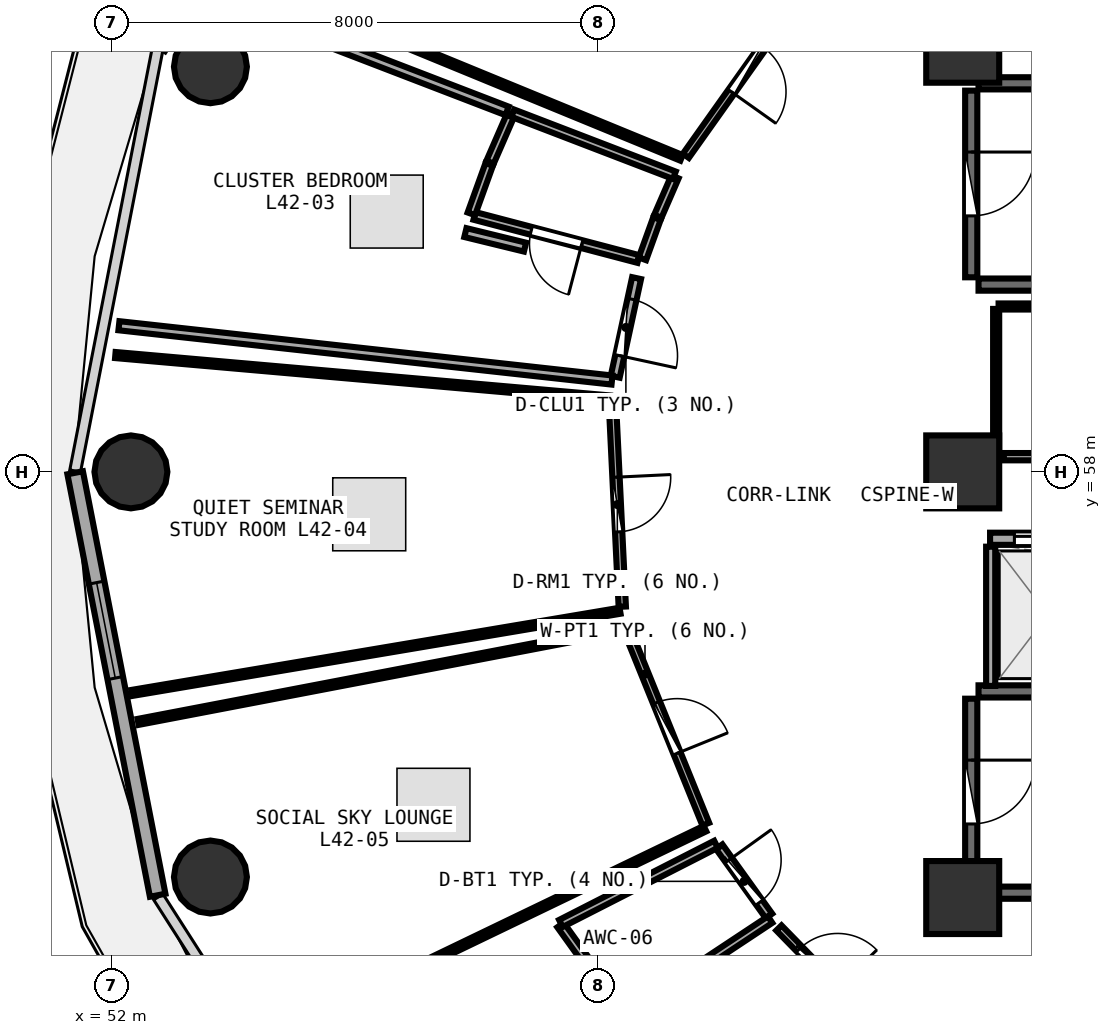
"""IFC4 building model, lengths in metres.
Left out: names, types, materials, properties, quantities, classifications, styles, units other than length and angle.
Written with IfcOpenShell. Run it as: python <this file> out.ifc"""

import sys

from ifc_helpers import new_model, si_unit, direction, frame, frame_2d, origin, origin_2d, place, context, subcontext, project, spatial, rectangle, circle, extrude, element, fill, save


model = new_model("IFC4")
c1 = context("Model", 3, precision=1e-05, world=origin(), true_north=direction((0.0, 1.0)))
c2 = subcontext(c1, "Body", "Model", "MODEL_VIEW")
j1 = project(units=[si_unit("LENGTHUNIT", "METRE"), si_unit("PLANEANGLEUNIT", "RADIAN")], contexts=[c1])
p1 = place(None, origin())
s1 = spatial("IfcSite", under=j1, at=p1, CompositionType="ELEMENT")
p2 = place(p1, origin())
s2 = spatial("IfcBuilding", under=s1, at=p2, CompositionType="ELEMENT")
p3 = place(p2, frame((0.0, 0.0, 165.6)))
s3 = spatial("IfcBuildingStorey", under=s2, at=p3, CompositionType="ELEMENT", Elevation=165.6)
for number, where, z_axis, x_axis in (
    (1, (66.0, 51.0, 0.0), (0.0, 0.0, 1.0), (1.0, 0.0, 0.0)),
    (2, (66.0, 65.0, 0.0), (0.0, 0.0, 1.0), (1.0, 0.0, 0.0)),
    (3, (66.0, 58.0, 0.0), (0.0, 0.0, 1.0), (1.0, 0.0, 0.0)),
):
    element("IfcColumn", number, at=place(p3, frame(where, z_axis=z_axis, x_axis=x_axis)), inside=s3, PredefinedType="PILASTER", context=c2, shape_type="SweptSolid", body=[
        extrude(rectangle(XDim=1.2, YDim=1.2, at=origin_2d()), origin(), (0.0, 0.0, 1.0), 3.75),
    ])
for number, where, z_axis, x_axis in (
    (4, (53.627, 64.663, 0.0), (0.0, 0.0, 1.0), (1.0, 0.0, 0.0)),
    (5, (52.32, 58.0, 0.0), (0.0, 0.0, 1.0), (1.0, 0.0, 0.0)),
    (6, (53.627, 51.337, 0.0), (0.0, 0.0, 1.0), (1.0, 0.0, 0.0)),
):
    element("IfcColumn", number, at=place(p3, frame(where, z_axis=z_axis, x_axis=x_axis)), inside=s3, PredefinedType="COLUMN", context=c2, shape_type="SweptSolid", body=[
        extrude(circle(Radius=0.6, at=origin_2d()), origin(), (0.0, 0.0, 1.0), 3.75),
    ])
p4 = place(p3, frame((51.403, 57.985, 0.0), z_axis=(0.0, 0.0, 1.0), x_axis=(0.191716984769, -0.981450252306, 0.0)))
e7 = element("IfcWall", 7, at=p4, inside=s3, PredefinedType="SOLIDWALL", context=c2, shape_type="SweptSolid", body=[
    extrude(rectangle(XDim=7.079, YDim=0.26, at=frame_2d((3.54, 0.0))), origin(), (0.0, 0.0, 1.0), 3.475),
])
p5 = place(p4, frame((1.84, 0.0, 0.85)))
e8 = element("IfcOpeningElement", 8, at=p5, cuts=e7, PredefinedType="OPENING", context=c2, shape_type="SweptSolid", body=[
    extrude(rectangle(XDim=1.6, YDim=1.45, at=frame_2d((0.8, 0.725))), frame((0.0, 0.14, 0.0), z_axis=(0.0, -1.0, 0.0), x_axis=(1.0, 0.0, 0.0)), (0.0, 0.0, 1.0), 0.28),
])
for number, where, z_axis, x_axis in (
    (9, (66.26, 61.08, 0.0), (0.0, 0.0, 1.0), (1.0, 0.0, 0.0)),
    (10, (73.42, 64.39, 0.0), (0.0, 0.0, 1.0), (-1.0, 0.0, 0.0)),
):
    element("IfcWall", number, at=place(p3, frame(where, z_axis=z_axis, x_axis=x_axis)), inside=s3, PredefinedType="SHEAR", context=c2, shape_type="SweptSolid", body=[
        extrude(rectangle(XDim=7.16, YDim=0.2, at=frame_2d((3.58, 0.0))), origin(), (0.0, 0.0, 1.0), 3.49),
    ])
p6 = place(p3, frame((66.14, 64.27, 0.0), z_axis=(0.0, 0.0, 1.0), x_axis=(0.0, -1.0, 0.0)))
e11 = element("IfcWall", 11, at=p6, inside=s3, PredefinedType="SHEAR", context=c2, shape_type="SweptSolid", body=[
    extrude(rectangle(XDim=3.07, YDim=0.2, at=frame_2d((1.535, 0.0))), origin(), (0.0, 0.0, 1.0), 3.49),
])
p7 = place(p6, frame((1.01, 0.0, 0.0)))
e12 = element("IfcOpeningElement", 12, at=p7, cuts=e11, PredefinedType="OPENING", context=c2, shape_type="SweptSolid", body=[
    extrude(rectangle(XDim=1.05, YDim=2.1, at=frame_2d((0.525, 1.05))), frame((0.0, 0.11, 0.0), z_axis=(0.0, -1.0, 0.0), x_axis=(1.0, 0.0, 0.0)), (0.0, 0.0, 1.0), 0.22),
])
for number, where, z_axis, x_axis in (
    (13, (66.26, 51.08, 0.0), (0.0, 0.0, 1.0), (1.0, 0.0, 0.0)),
    (14, (73.42, 54.39, 0.0), (0.0, 0.0, 1.0), (-1.0, 0.0, 0.0)),
):
    element("IfcWall", number, at=place(p3, frame(where, z_axis=z_axis, x_axis=x_axis)), inside=s3, PredefinedType="SHEAR", context=c2, shape_type="SweptSolid", body=[
        extrude(rectangle(XDim=7.16, YDim=0.2, at=frame_2d((3.58, 0.0))), origin(), (0.0, 0.0, 1.0), 3.49),
    ])
p8 = place(p3, frame((66.14, 54.27, 0.0), z_axis=(0.0, 0.0, 1.0), x_axis=(0.0, -1.0, 0.0)))
e15 = element("IfcWall", 15, at=p8, inside=s3, PredefinedType="SHEAR", context=c2, shape_type="SweptSolid", body=[
    extrude(rectangle(XDim=3.07, YDim=0.2, at=frame_2d((1.535, 0.0))), origin(), (0.0, 0.0, 1.0), 3.49),
])
p9 = place(p8, frame((1.01, 0.0, 0.0)))
e16 = element("IfcOpeningElement", 16, at=p9, cuts=e15, PredefinedType="OPENING", context=c2, shape_type="SweptSolid", body=[
    extrude(rectangle(XDim=1.05, YDim=2.1, at=frame_2d((0.525, 1.05))), frame((0.0, 0.11, 0.0), z_axis=(0.0, -1.0, 0.0), x_axis=(1.0, 0.0, 0.0)), (0.0, 0.0, 1.0), 0.22),
])
p10 = place(p3, frame((66.45, 56.9, 0.0), z_axis=(0.0, 0.0, 1.0), x_axis=(1.0, 0.0, 0.0)))
e17 = element("IfcWall", 17, at=p10, inside=s3, PredefinedType="SOLIDWALL", context=c2, shape_type="SweptSolid", body=[
    extrude(rectangle(XDim=14.4, YDim=0.2, at=frame_2d((7.2, 0.0))), origin(), (0.0, 0.0, 1.0), 3.48),
])
p11 = place(p10, frame((0.4, 0.0, 0.0)))
e18 = element("IfcOpeningElement", 18, at=p11, cuts=e17, PredefinedType="OPENING", context=c2, shape_type="SweptSolid", body=[
    extrude(rectangle(XDim=1.1, YDim=2.1, at=frame_2d((0.55, 1.05))), frame((0.0, 0.11, 0.0), z_axis=(0.0, -1.0, 0.0), x_axis=(1.0, 0.0, 0.0)), (0.0, 0.0, 1.0), 0.22),
])
p12 = place(p10, frame((2.4, 0.0, 0.0)))
e19 = element("IfcOpeningElement", 19, at=p12, cuts=e17, PredefinedType="OPENING", context=c2, shape_type="SweptSolid", body=[
    extrude(rectangle(XDim=1.1, YDim=2.1, at=frame_2d((0.55, 1.05))), frame((0.0, 0.11, 0.0), z_axis=(0.0, -1.0, 0.0), x_axis=(1.0, 0.0, 0.0)), (0.0, 0.0, 1.0), 0.22),
])
p13 = place(p10, frame((4.4, 0.0, 0.0)))
e20 = element("IfcOpeningElement", 20, at=p13, cuts=e17, PredefinedType="OPENING", context=c2, shape_type="SweptSolid", body=[
    extrude(rectangle(XDim=1.1, YDim=2.1, at=frame_2d((0.55, 1.05))), frame((0.0, 0.11, 0.0), z_axis=(0.0, -1.0, 0.0), x_axis=(1.0, 0.0, 0.0)), (0.0, 0.0, 1.0), 0.22),
])
p14 = place(p3, frame((66.46, 54.48, 0.0), z_axis=(0.0, 0.0, 1.0), x_axis=(0.0, 1.0, 0.0)))
e21 = element("IfcWall", 21, at=p14, inside=s3, PredefinedType="PARTITIONING", context=c2, shape_type="SweptSolid", body=[
    extrude(rectangle(XDim=2.29, YDim=0.15, at=frame_2d((1.145, 0.0))), origin(), (0.0, 0.0, 1.0), 3.48),
])
p15 = place(p3, frame((66.675, 58.25, 0.0), z_axis=(0.0, 0.0, 1.0), x_axis=(1.0, 0.0, 0.0)))
e22 = element("IfcWall", 22, at=p15, inside=s3, PredefinedType="PARTITIONING", context=c2, shape_type="SweptSolid", body=[
    extrude(rectangle(XDim=3.265, YDim=0.12, at=frame_2d((1.632, 0.0))), origin(), (0.0, 0.0, 1.0), 3.48),
])
p16 = place(p15, frame((1.182, 0.0, 0.0)))
e23 = element("IfcOpeningElement", 23, at=p16, cuts=e22, PredefinedType="OPENING", context=c2, shape_type="SweptSolid", body=[
    extrude(rectangle(XDim=0.9, YDim=2.08, at=frame_2d((0.45, 1.04))), frame((0.0, 0.07, 0.0), z_axis=(0.0, -1.0, 0.0), x_axis=(1.0, 0.0, 0.0)), (0.0, 0.0, 1.0), 0.14),
])
p17 = place(p3, frame((63.462, 66.038, 0.0), z_axis=(0.0, 0.0, 1.0), x_axis=(-0.578762045024, -0.815496471629, 0.0)))
e24 = element("IfcWall", 24, at=p17, inside=s3, PredefinedType="PARTITIONING", context=c2, shape_type="SweptSolid", body=[
    extrude(rectangle(XDim=3.483, YDim=0.12, at=frame_2d((1.741, 0.0))), origin(), (0.0, 0.0, 1.0), 2.975),
])
p18 = place(p17, frame((1.291, 0.0, 0.0)))
e25 = element("IfcOpeningElement", 25, at=p18, cuts=e24, PredefinedType="OPENING", context=c2, shape_type="SweptSolid", body=[
    extrude(rectangle(XDim=0.9, YDim=2.08, at=frame_2d((0.45, 1.04))), frame((0.0, 0.07, 0.0), z_axis=(0.0, -1.0, 0.0), x_axis=(1.0, 0.0, 0.0)), (0.0, 0.0, 1.0), 0.14),
])
p19 = place(p3, frame((60.667, 61.5, 0.0), z_axis=(0.0, 0.0, 1.0), x_axis=(-0.967098346806, 0.254402805813, 0.0)))
e26 = element("IfcWall", 26, at=p19, inside=s3, PredefinedType="PLUMBINGWALL", context=c2, shape_type="SweptSolid", body=[
    extrude(rectangle(XDim=2.789, YDim=0.13, at=frame_2d((1.395, 0.0))), origin(), (0.0, 0.0, 1.0), 3.175),
])
p20 = place(p19, frame((0.964, 0.0, 0.0)))
e27 = element("IfcOpeningElement", 27, at=p20, cuts=e26, PredefinedType="OPENING", context=c2, shape_type="SweptSolid", body=[
    extrude(rectangle(XDim=0.86, YDim=2.05, at=frame_2d((0.43, 1.025))), frame((0.0, 0.075, 0.0), z_axis=(0.0, -1.0, 0.0), x_axis=(1.0, 0.0, 0.0)), (0.0, 0.0, 1.0), 0.15),
])
p21 = place(p3, frame((60.636, 61.186, 0.0), z_axis=(0.0, 0.0, 1.0), x_axis=(-0.211879832264, -0.977295726318, 0.0)))
e28 = element("IfcWall", 28, at=p21, inside=s3, PredefinedType="PARTITIONING", context=c2, shape_type="SweptSolid", body=[
    extrude(rectangle(XDim=1.659, YDim=0.15, at=frame_2d((0.83, 0.0))), origin(), (0.0, 0.0, 1.0), 3.48),
])
p22 = place(p21, frame((0.355, 0.0, 0.0)))
e29 = element("IfcOpeningElement", 29, at=p22, cuts=e28, PredefinedType="OPENING", context=c2, shape_type="SweptSolid", body=[
    extrude(rectangle(XDim=0.95, YDim=2.08, at=frame_2d((0.475, 1.04))), frame((0.0, 0.085, 0.0), z_axis=(0.0, -1.0, 0.0), x_axis=(1.0, 0.0, 0.0)), (0.0, 0.0, 1.0), 0.17),
])
p23 = place(p3, frame((60.238, 59.144, 0.0), z_axis=(0.0, 0.0, 1.0), x_axis=(0.048537190422, -0.998821375996, 0.0)))
e30 = element("IfcWall", 30, at=p23, inside=s3, PredefinedType="PARTITIONING", context=c2, shape_type="SweptSolid", body=[
    extrude(rectangle(XDim=3.365, YDim=0.12, at=frame_2d((1.683, 0.0))), origin(), (0.0, 0.0, 1.0), 2.975),
])
p24 = place(p23, frame((1.233, 0.0, 0.0)))
e31 = element("IfcOpeningElement", 31, at=p24, cuts=e30, PredefinedType="OPENING", context=c2, shape_type="SweptSolid", body=[
    extrude(rectangle(XDim=0.9, YDim=2.08, at=frame_2d((0.45, 1.04))), frame((0.0, 0.07, 0.0), z_axis=(0.0, -1.0, 0.0), x_axis=(1.0, 0.0, 0.0)), (0.0, 0.0, 1.0), 0.14),
])
p25 = place(p3, frame((60.492, 55.369, 0.0), z_axis=(0.0, 0.0, 1.0), x_axis=(0.3756420079, -0.926764847143, 0.0)))
e32 = element("IfcWall", 32, at=p25, inside=s3, PredefinedType="PARTITIONING", context=c2, shape_type="SweptSolid", body=[
    extrude(rectangle(XDim=3.413, YDim=0.12, at=frame_2d((1.707, 0.0))), origin(), (0.0, 0.0, 1.0), 3.235),
])
p26 = place(p25, frame((1.256, 0.0, 0.0)))
e33 = element("IfcOpeningElement", 33, at=p26, cuts=e32, PredefinedType="OPENING", context=c2, shape_type="SweptSolid", body=[
    extrude(rectangle(XDim=0.9, YDim=2.08, at=frame_2d((0.45, 1.04))), frame((0.0, 0.07, 0.0), z_axis=(0.0, -1.0, 0.0), x_axis=(1.0, 0.0, 0.0)), (0.0, 0.0, 1.0), 0.14),
])
p27 = place(p3, frame((61.995, 51.836, 0.0), z_axis=(0.0, 0.0, 1.0), x_axis=(0.583589438572, -0.81204886995, 0.0)))
e34 = element("IfcWall", 34, at=p27, inside=s3, PredefinedType="PLUMBINGWALL", context=c2, shape_type="SweptSolid", body=[
    extrude(rectangle(XDim=1.403, YDim=0.13, at=frame_2d((0.702, 0.0))), origin(), (0.0, 0.0, 1.0), 2.975),
])
p28 = place(p27, frame((0.272, 0.0, 0.0)))
e35 = element("IfcOpeningElement", 35, at=p28, cuts=e34, PredefinedType="OPENING", context=c2, shape_type="SweptSolid", body=[
    extrude(rectangle(XDim=0.86, YDim=2.05, at=frame_2d((0.43, 1.025))), frame((0.0, 0.075, 0.0), z_axis=(0.0, -1.0, 0.0), x_axis=(1.0, 0.0, 0.0)), (0.0, 0.0, 1.0), 0.15),
])
p29 = place(p3, frame((62.977, 50.5, 0.0), z_axis=(0.0, 0.0, 1.0), x_axis=(0.69801962686, -0.71607862733, 0.0)))
e36 = element("IfcWall", 36, at=p29, inside=s3, PredefinedType="PARTITIONING", context=c2, shape_type="SweptSolid", body=[
    extrude(rectangle(XDim=1.866, YDim=0.12, at=frame_2d((0.933, 0.0))), origin(), (0.0, 0.0, 1.0), 2.975),
])
p30 = place(p29, frame((0.483, 0.0, 0.0)))
e37 = element("IfcOpeningElement", 37, at=p30, cuts=e36, PredefinedType="OPENING", context=c2, shape_type="SweptSolid", body=[
    extrude(rectangle(XDim=0.9, YDim=2.08, at=frame_2d((0.45, 1.04))), frame((0.0, 0.07, 0.0), z_axis=(0.0, -1.0, 0.0), x_axis=(1.0, 0.0, 0.0)), (0.0, 0.0, 1.0), 0.14),
])
p31 = place(p3, frame((69.96, 60.72, 0.0), z_axis=(0.0, 0.0, 1.0), x_axis=(-1.0, 0.0, 0.0)))
e38 = element("IfcWall", 38, at=p31, inside=s3, PredefinedType="PARTITIONING", context=c2, shape_type="SweptSolid", body=[
    extrude(rectangle(XDim=3.37, YDim=0.1, at=frame_2d((1.685, 0.0))), origin(), (0.0, 0.0, 1.0), 3.48),
])
p32 = place(p3, frame((66.55, 60.68, 0.0), z_axis=(0.0, 0.0, 1.0), x_axis=(0.0, -1.0, 0.0)))
e39 = element("IfcWall", 39, at=p32, inside=s3, PredefinedType="PARTITIONING", context=c2, shape_type="SweptSolid", body=[
    extrude(rectangle(XDim=2.383, YDim=0.1, at=frame_2d((1.191, 0.0))), origin(), (0.0, 0.0, 1.0), 3.48),
])
p33 = place(p3, frame((61.375, 63.164, 0.0), z_axis=(0.0, 0.0, 1.0), x_axis=(-0.924943940784, 0.380103546953, 0.0)))
e40 = element("IfcWall", 40, at=p33, inside=s3, PredefinedType="PARTITIONING", context=c2, shape_type="SweptSolid", body=[
    extrude(rectangle(XDim=8.038, YDim=0.1, at=frame_2d((4.019, 0.0))), origin(), (0.0, 0.0, 1.0), 2.975),
])
p34 = place(p3, frame((61.268, 62.853, 0.0), z_axis=(0.0, 0.0, 1.0), x_axis=(-0.398284741881, -0.917261829787, 0.0)))
e41 = element("IfcWall", 41, at=p34, inside=s3, PredefinedType="PLUMBINGWALL", context=c2, shape_type="SweptSolid", body=[
    extrude(rectangle(XDim=0.708, YDim=0.13, at=frame_2d((0.354, 0.0))), origin(), (0.0, 0.0, 1.0), 3.235),
])
p35 = place(p3, frame((60.971, 62.166, 0.0), z_axis=(0.0, 0.0, 1.0), x_axis=(-0.340044773791, -0.940409246987, 0.0)))
e42 = element("IfcWall", 42, at=p35, inside=s3, PredefinedType="PLUMBINGWALL", context=c2, shape_type="SweptSolid", body=[
    extrude(rectangle(XDim=0.704, YDim=0.13, at=frame_2d((0.352, 0.0))), origin(), (0.0, 0.0, 1.0), 3.235),
])
p36 = place(p3, frame((57.919, 62.244, 0.0), z_axis=(0.0, 0.0, 1.0), x_axis=(0.339790338004, 0.9405012101, 0.0)))
e43 = element("IfcWall", 43, at=p36, inside=s3, PredefinedType="PLUMBINGWALL", context=c2, shape_type="SweptSolid", body=[
    extrude(rectangle(XDim=0.864, YDim=0.13, at=frame_2d((0.432, 0.0))), origin(), (0.0, 0.0, 1.0), 3.175),
])
p37 = place(p3, frame((58.227, 63.093, 0.0), z_axis=(0.0, 0.0, 1.0), x_axis=(0.39925148709, 0.916841453064, 0.0)))
e44 = element("IfcWall", 44, at=p37, inside=s3, PredefinedType="PLUMBINGWALL", context=c2, shape_type="SweptSolid", body=[
    extrude(rectangle(XDim=0.866, YDim=0.13, at=frame_2d((0.433, 0.0))), origin(), (0.0, 0.0, 1.0), 3.175),
])
p38 = place(p3, frame((58.6, 63.899, 0.0), z_axis=(0.0, 0.0, 1.0), x_axis=(0.933544382438, -0.358461833418, 0.0)))
e45 = element("IfcWall", 45, at=p38, inside=s3, PredefinedType="PLUMBINGWALL", context=c2, shape_type="SweptSolid", body=[
    extrude(rectangle(XDim=2.847, YDim=0.13, at=frame_2d((1.423, 0.0))), origin(), (0.0, 0.0, 1.0), 3.175),
])
p39 = place(p3, frame((60.232, 59.51, 0.0), z_axis=(0.0, 0.0, 1.0), x_axis=(-0.993990557846, 0.109465843587, 0.0)))
e46 = element("IfcWall", 46, at=p39, inside=s3, PredefinedType="PARTITIONING", context=c2, shape_type="SweptSolid", body=[
    extrude(rectangle(XDim=8.158, YDim=0.15, at=frame_2d((4.079, 0.0))), origin(), (0.0, 0.0, 1.0), 3.025),
])
p40 = place(p3, frame((53.723, 65.777, 0.0), z_axis=(0.0, 0.0, 1.0), x_axis=(0.933303856141, -0.359087610636, 0.0)))
e47 = element("IfcWall", 47, at=p40, inside=s3, PredefinedType="PARTITIONING", context=c2, shape_type="SweptSolid", body=[
    extrude(rectangle(XDim=5.125, YDim=0.15, at=frame_2d((2.562, 0.0))), origin(), (0.0, 0.0, 1.0), 2.975),
])
p41 = place(p3, frame((57.821, 61.936, 0.0), z_axis=(0.0, 0.0, 1.0), x_axis=(0.971451046406, -0.237240098712, 0.0)))
e48 = element("IfcWall", 48, at=p41, inside=s3, PredefinedType="PARTITIONING", context=c2, shape_type="SweptSolid", body=[
    extrude(rectangle(XDim=1.01, YDim=0.15, at=frame_2d((0.505, 0.0))), origin(), (0.0, 0.0, 1.0), 3.175),
])
p42 = place(p3, frame((60.365, 55.716, 0.0), z_axis=(0.0, 0.0, 1.0), x_axis=(-0.986127701838, -0.165988420279, 0.0)))
e49 = element("IfcWall", 49, at=p42, inside=s3, PredefinedType="PARTITIONING", context=c2, shape_type="SweptSolid", body=[
    extrude(rectangle(XDim=8.144, YDim=0.1, at=frame_2d((4.072, 0.0))), origin(), (0.0, 0.0, 1.0), 3.025),
])
p43 = place(p3, frame((52.064, 59.921, 0.0), z_axis=(0.0, 0.0, 1.0), x_axis=(0.996168646625, -0.087453001553, 0.0)))
e50 = element("IfcWall", 50, at=p43, inside=s3, PredefinedType="PARTITIONING", context=c2, shape_type="SweptSolid", body=[
    extrude(rectangle(XDim=8.163, YDim=0.1, at=frame_2d((4.082, 0.0))), origin(), (0.0, 0.0, 1.0), 3.025),
])
p44 = place(p3, frame((61.761, 52.134, 0.0), z_axis=(0.0, 0.0, 1.0), x_axis=(-0.900968975812, -0.433883515042, 0.0)))
e51 = element("IfcWall", 51, at=p44, inside=s3, PredefinedType="PARTITIONING", context=c2, shape_type="SweptSolid", body=[
    extrude(rectangle(XDim=8.0, YDim=0.1, at=frame_2d((4.0, 0.0))), origin(), (0.0, 0.0, 1.0), 2.975),
])
p45 = place(p3, frame((52.438, 53.888, 0.0), z_axis=(0.0, 0.0, 1.0), x_axis=(0.982187250003, 0.187904778897, 0.0)))
e52 = element("IfcWall", 52, at=p45, inside=s3, PredefinedType="PARTITIONING", context=c2, shape_type="SweptSolid", body=[
    extrude(rectangle(XDim=8.137, YDim=0.1, at=frame_2d((4.069, 0.0))), origin(), (0.0, 0.0, 1.0), 3.025),
])
p46 = place(p3, frame((62.832, 50.637, 0.0), z_axis=(0.0, 0.0, 1.0), x_axis=(-0.833743735775, -0.55215159427, 0.0)))
e53 = element("IfcWall", 53, at=p46, inside=s3, PredefinedType="PLUMBINGWALL", context=c2, shape_type="SweptSolid", body=[
    extrude(rectangle(XDim=2.833, YDim=0.13, at=frame_2d((1.416, 0.0))), origin(), (0.0, 0.0, 1.0), 3.235),
])
p47 = place(p3, frame((60.442, 49.078, 0.0), z_axis=(0.0, 0.0, 1.0), x_axis=(-0.583480474688, 0.812127167172, 0.0)))
e54 = element("IfcWall", 54, at=p47, inside=s3, PredefinedType="PLUMBINGWALL", context=c2, shape_type="SweptSolid", body=[
    extrude(rectangle(XDim=1.811, YDim=0.13, at=frame_2d((0.906, 0.0))), origin(), (0.0, 0.0, 1.0), 3.48),
])
p48 = place(p3, frame((59.392, 50.574, 0.0), z_axis=(0.0, 0.0, 1.0), x_axis=(0.890678731245, 0.45463325627, 0.0)))
e55 = element("IfcWall", 55, at=p48, inside=s3, PredefinedType="PLUMBINGWALL", context=c2, shape_type="SweptSolid", body=[
    extrude(rectangle(XDim=2.863, YDim=0.13, at=frame_2d((1.432, 0.0))), origin(), (0.0, 0.0, 1.0), 2.975),
])
p49 = place(p5, origin())
e56 = element("IfcWindow", 56, at=p49, inside=s3, PartitioningType="SINGLE_PANEL", PredefinedType="WINDOW", context=c2, shape_type="SweptSolid", body=[
    extrude(rectangle(XDim=1.6, YDim=1.45, at=frame_2d((0.8, 0.725))), frame((0.0, 0.03, 0.0), z_axis=(0.0, -1.0, 0.0), x_axis=(1.0, 0.0, 0.0)), (0.0, 0.0, 1.0), 0.06),
])
fill(e8, e56)
p50 = place(p7, origin())
e57 = element("IfcDoor", 57, at=p50, inside=s3, OperationType="SINGLE_SWING_LEFT", PredefinedType="DOOR", context=c2, shape_type="SweptSolid", body=[
    extrude(rectangle(XDim=1.05, YDim=2.1, at=frame_2d((0.525, 1.05))), frame((0.0, 0.025, 0.0), z_axis=(0.0, -1.0, 0.0), x_axis=(1.0, 0.0, 0.0)), (0.0, 0.0, 1.0), 0.05),
])
fill(e12, e57)
p51 = place(p9, origin())
e58 = element("IfcDoor", 58, at=p51, inside=s3, OperationType="SINGLE_SWING_LEFT", PredefinedType="DOOR", context=c2, shape_type="SweptSolid", body=[
    extrude(rectangle(XDim=1.05, YDim=2.1, at=frame_2d((0.525, 1.05))), frame((0.0, 0.025, 0.0), z_axis=(0.0, -1.0, 0.0), x_axis=(1.0, 0.0, 0.0)), (0.0, 0.0, 1.0), 0.05),
])
fill(e16, e58)
p52 = place(p11, origin())
e59 = element("IfcDoor", 59, at=p52, inside=s3, OperationType="DOUBLE_DOOR_SLIDING", PredefinedType="DOOR", context=c2, shape_type="SweptSolid", body=[
    extrude(rectangle(XDim=1.1, YDim=2.1, at=frame_2d((0.55, 1.05))), frame((0.0, 0.025, 0.0), z_axis=(0.0, -1.0, 0.0), x_axis=(1.0, 0.0, 0.0)), (0.0, 0.0, 1.0), 0.05),
])
fill(e18, e59)
p53 = place(p18, origin())
e60 = element("IfcDoor", 60, at=p53, inside=s3, OperationType="SINGLE_SWING_RIGHT", PredefinedType="DOOR", context=c2, shape_type="SweptSolid", body=[
    extrude(rectangle(XDim=0.9, YDim=2.08, at=frame_2d((0.45, 1.04))), frame((0.0, 0.025, 0.0), z_axis=(0.0, -1.0, 0.0), x_axis=(1.0, 0.0, 0.0)), (0.0, 0.0, 1.0), 0.05),
])
fill(e25, e60)
p54 = place(p20, origin())
e61 = element("IfcDoor", 61, at=p54, inside=s3, OperationType="SINGLE_SWING_LEFT", PredefinedType="DOOR", context=c2, shape_type="SweptSolid", body=[
    extrude(rectangle(XDim=0.86, YDim=2.05, at=frame_2d((0.43, 1.025))), frame((0.0, 0.025, 0.0), z_axis=(0.0, -1.0, 0.0), x_axis=(1.0, 0.0, 0.0)), (0.0, 0.0, 1.0), 0.05),
])
fill(e27, e61)
p55 = place(p22, origin())
e62 = element("IfcDoor", 62, at=p55, inside=s3, OperationType="SINGLE_SWING_RIGHT", PredefinedType="DOOR", context=c2, shape_type="SweptSolid", body=[
    extrude(rectangle(XDim=0.95, YDim=2.08, at=frame_2d((0.475, 1.04))), frame((0.0, 0.025, 0.0), z_axis=(0.0, -1.0, 0.0), x_axis=(1.0, 0.0, 0.0)), (0.0, 0.0, 1.0), 0.05),
])
fill(e29, e62)
p56 = place(p24, origin())
e63 = element("IfcDoor", 63, at=p56, inside=s3, OperationType="SINGLE_SWING_LEFT", PredefinedType="DOOR", context=c2, shape_type="SweptSolid", body=[
    extrude(rectangle(XDim=0.9, YDim=2.08, at=frame_2d((0.45, 1.04))), frame((0.0, 0.025, 0.0), z_axis=(0.0, -1.0, 0.0), x_axis=(1.0, 0.0, 0.0)), (0.0, 0.0, 1.0), 0.05),
])
fill(e31, e63)
p57 = place(p26, origin())
e64 = element("IfcDoor", 64, at=p57, inside=s3, OperationType="SINGLE_SWING_RIGHT", PredefinedType="DOOR", context=c2, shape_type="SweptSolid", body=[
    extrude(rectangle(XDim=0.9, YDim=2.08, at=frame_2d((0.45, 1.04))), frame((0.0, 0.025, 0.0), z_axis=(0.0, -1.0, 0.0), x_axis=(1.0, 0.0, 0.0)), (0.0, 0.0, 1.0), 0.05),
])
fill(e33, e64)
p58 = place(p28, origin())
e65 = element("IfcDoor", 65, at=p58, inside=s3, OperationType="SINGLE_SWING_LEFT", PredefinedType="DOOR", context=c2, shape_type="SweptSolid", body=[
    extrude(rectangle(XDim=0.86, YDim=2.05, at=frame_2d((0.43, 1.025))), frame((0.0, 0.025, 0.0), z_axis=(0.0, -1.0, 0.0), x_axis=(1.0, 0.0, 0.0)), (0.0, 0.0, 1.0), 0.05),
])
fill(e35, e65)
p59 = place(p30, origin())
e66 = element("IfcDoor", 66, at=p59, inside=s3, OperationType="SINGLE_SWING_RIGHT", PredefinedType="DOOR", context=c2, shape_type="SweptSolid", body=[
    extrude(rectangle(XDim=0.9, YDim=2.08, at=frame_2d((0.45, 1.04))), frame((0.0, 0.025, 0.0), z_axis=(0.0, -1.0, 0.0), x_axis=(1.0, 0.0, 0.0)), (0.0, 0.0, 1.0), 0.05),
])
fill(e37, e66)
save(model, sys.argv[1])
